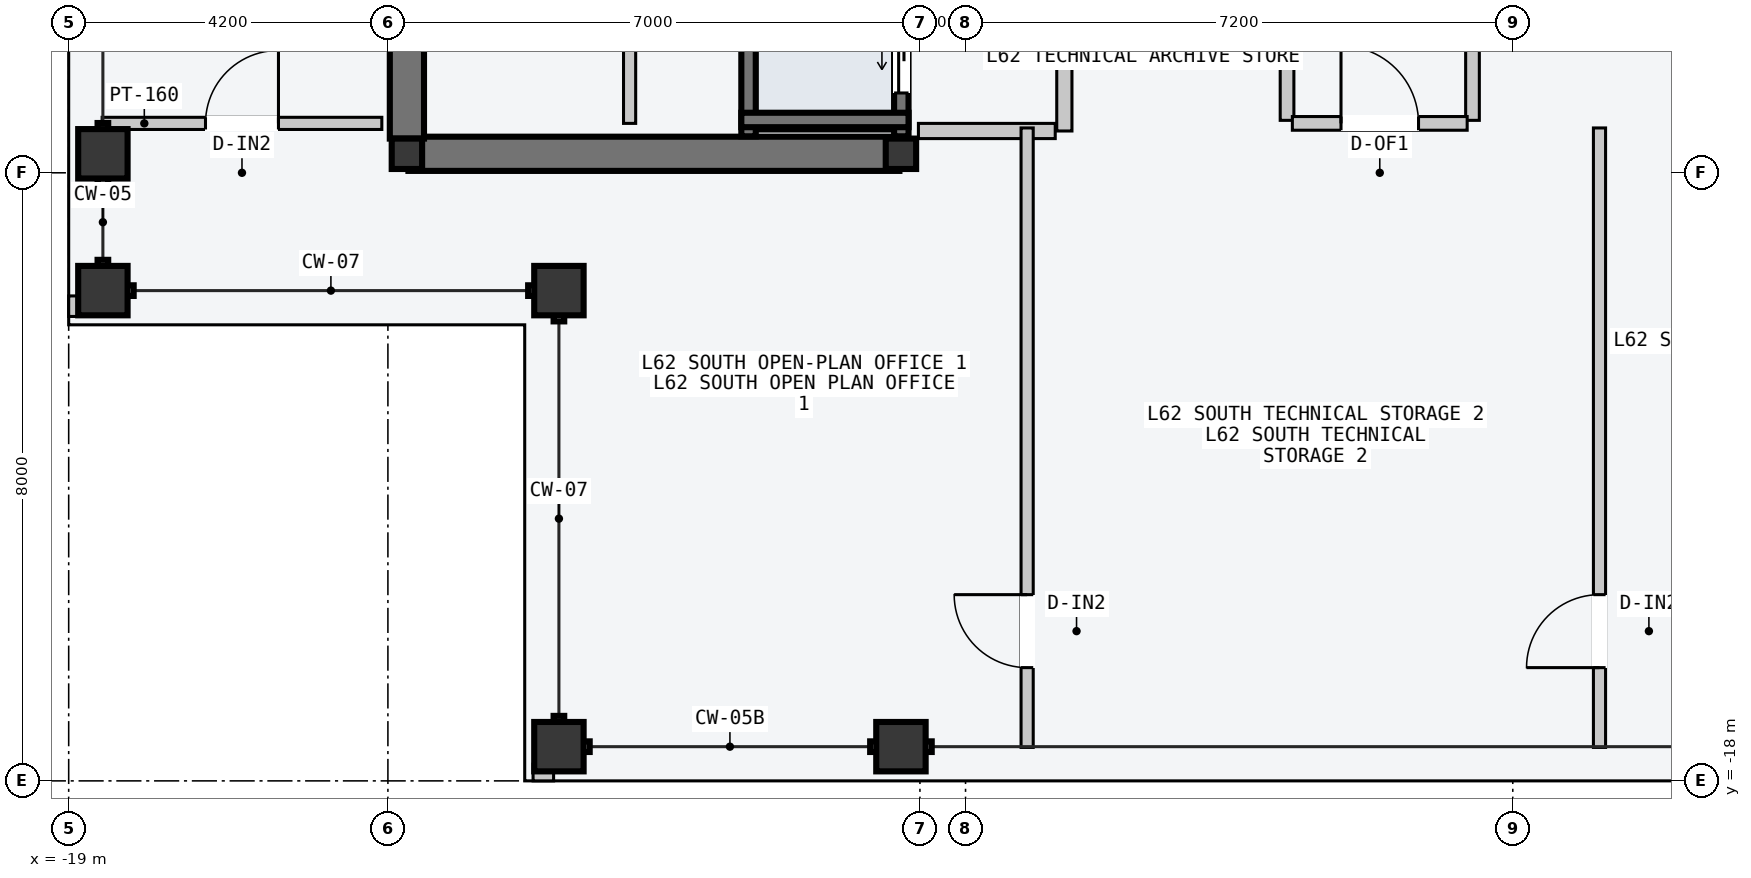
"""IFC4 building model, lengths in metres.
Left out: names, types, materials, properties, quantities, classifications, styles, units other than length and angle.
Written with IfcOpenShell. Run it as: python <this file> out.ifc"""

import sys

from ifc_helpers import new_model, si_unit, direction, frame, frame_2d, origin, origin_2d, place, context, subcontext, project, spatial, rectangle, hollow_rectangle, i_section, extrude, element, fill, save


model = new_model("IFC4")
c1 = context("Model", 3, precision=1e-05, world=origin(), true_north=direction((0.0, 1.0)))
c2 = subcontext(c1, "Body", "Model", "MODEL_VIEW")
j1 = project(units=[si_unit("LENGTHUNIT", "METRE"), si_unit("PLANEANGLEUNIT", "RADIAN")], contexts=[c1])
p1 = place(None, origin())
s1 = spatial("IfcSite", under=j1, at=p1, CompositionType="ELEMENT")
p2 = place(p1, origin())
s2 = spatial("IfcBuilding", under=s1, at=p2, CompositionType="ELEMENT")
p3 = place(p2, frame((0.0, 0.0, 236.4)))
s3 = spatial("IfcBuildingStorey", under=s2, at=p3, CompositionType="ELEMENT", Elevation=236.4)
p4 = place(p3, frame((-14.53, -9.75, -0.2), z_axis=(0.0, 0.0, 1.0), x_axis=(1.0, 0.0, 0.0)))
e1 = element("IfcWall", 1, at=p4, inside=s3, PredefinedType="SHEAR", context=c2, shape_type="SweptSolid", body=[
    extrude(rectangle(XDim=6.46, YDim=0.45, at=frame_2d((3.23, 0.0))), origin(), (0.0, 0.0, 1.0), 3.6),
])
p5 = place(p3, frame((-14.55, -9.55, -0.2), z_axis=(0.0, 0.0, 1.0), x_axis=(0.0, 1.0, 0.0)))
e2 = element("IfcWall", 2, at=p5, inside=s3, PredefinedType="SHEAR", context=c2, shape_type="SweptSolid", body=[
    extrude(rectangle(XDim=9.35, YDim=0.45, at=frame_2d((4.675, 0.0))), origin(), (0.0, 0.0, 1.0), 3.6),
])
for number, where, z_axis, x_axis in (
    (3, (-14.55, -9.75, 0.0), (0.0, 0.0, 1.0), (1.0, 0.0, 0.0)),
    (4, (-8.05, -9.75, 0.0), (0.0, 0.0, 1.0), (1.0, 0.0, 0.0)),
):
    element("IfcColumn", number, at=place(p3, frame(where, z_axis=z_axis, x_axis=x_axis)), inside=s3, PredefinedType="COLUMN", context=c2, shape_type="SweptSolid", body=[
        extrude(i_section(OverallWidth=0.4, OverallDepth=0.4, WebThickness=0.013, FlangeThickness=0.021, at=origin_2d()), origin(), (0.0, 0.0, 1.0), 3.6),
    ])
for number, where, z_axis, x_axis in (
    (5, (-12.55, -17.55, 0.0), (0.0, 0.0, 1.0), (1.0, 0.0, 0.0)),
    (6, (-8.05, -17.55, 0.0), (0.0, 0.0, 1.0), (1.0, 0.0, 0.0)),
    (7, (-18.55, -11.55, 0.0), (0.0, 0.0, 1.0), (0.0, 1.0, 0.0)),
    (8, (-18.55, -9.75, 0.0), (0.0, 0.0, 1.0), (0.0, 1.0, 0.0)),
    (9, (-12.55, -11.55, 0.0), (0.0, 0.0, 1.0), (1.0, 0.0, 0.0)),
):
    element("IfcColumn", number, at=place(p3, frame(where, z_axis=z_axis, x_axis=x_axis)), inside=s3, PredefinedType="COLUMN", context=c2, shape_type="SweptSolid", body=[
        extrude(hollow_rectangle(XDim=0.65, YDim=0.65, WallThickness=0.028, at=origin_2d()), origin(), (0.0, 0.0, 1.0), 3.6),
    ])
for number, where, z_axis, x_axis in (
    (10, (-12.89, -17.89, 0.0), (0.0, 0.0, 1.0), (1.0, 0.0, 0.0)),
    (11, (-18.89, -11.89, 0.0), (0.0, 0.0, 1.0), (0.0, 1.0, 0.0)),
):
    element("IfcWall", number, at=place(p3, frame(where, z_axis=z_axis, x_axis=x_axis)), inside=s3, PredefinedType="PARAPET", context=c2, shape_type="SweptSolid", body=[
        extrude(rectangle(XDim=0.27, YDim=0.22, at=frame_2d((0.135, 0.0))), origin(), (0.0, 0.0, 1.0), 1.2),
    ])
p6 = place(p3, frame((-8.045, -9.52, -0.2), z_axis=(0.0, 0.0, 1.0), x_axis=(0.0, 1.0, 0.0)))
e12 = element("IfcWall", 12, at=p6, inside=s3, PredefinedType="SOLIDWALL", context=c2, shape_type="SweptSolid", body=[
    extrude(rectangle(XDim=2.12, YDim=0.19, at=frame_2d((1.06, 0.0))), origin(), (0.0, 0.0, 1.0), 3.6),
])
p7 = place(p6, frame((0.57, 0.0, 0.2)))
e13 = element("IfcOpeningElement", 13, at=p7, cuts=e12, PredefinedType="OPENING", context=c2, shape_type="SweptSolid", body=[
    extrude(rectangle(XDim=1.1, YDim=2.2, at=frame_2d((0.55, 1.1))), frame((0.0, 0.105, 0.0), z_axis=(0.0, -1.0, 0.0), x_axis=(1.0, 0.0, 0.0)), (0.0, 0.0, 1.0), 0.21),
])
p8 = place(p3, frame((-10.055, -9.52, -0.2), z_axis=(0.0, 0.0, 1.0), x_axis=(0.0, 1.0, 0.0)))
e14 = element("IfcWall", 14, at=p8, inside=s3, PredefinedType="SOLIDWALL", context=c2, shape_type="SweptSolid", body=[
    extrude(rectangle(XDim=2.12, YDim=0.19, at=frame_2d((1.06, 0.0))), origin(), (0.0, 0.0, 1.0), 3.6),
])
p9 = place(p3, frame((-10.15, -9.305, -0.2), z_axis=(0.0, 0.0, 1.0), x_axis=(1.0, 0.0, 0.0)))
e15 = element("IfcWall", 15, at=p9, inside=s3, PredefinedType="SOLIDWALL", context=c2, shape_type="SweptSolid", body=[
    extrude(rectangle(XDim=2.2, YDim=0.19, at=frame_2d((1.1, 0.0))), origin(), (0.0, 0.0, 1.0), 3.6),
])
p10 = place(p3, frame((-5.9, -9.45, 0.0), z_axis=(0.0, 0.0, 1.0), x_axis=(0.0, 1.0, 0.0)))
e16 = element("IfcWall", 16, at=p10, inside=s3, PredefinedType="PARTITIONING", context=c2, shape_type="SweptSolid", body=[
    extrude(rectangle(XDim=10.5, YDim=0.2, at=frame_2d((5.25, 0.0))), origin(), (0.0, 0.0, 1.0), 3.4),
])
p11 = place(p10, frame((3.9, 0.0, 0.0)))
e17 = element("IfcOpeningElement", 17, at=p11, cuts=e16, PredefinedType="OPENING", context=c2, shape_type="SweptSolid", body=[
    extrude(rectangle(XDim=1.5, YDim=2.2, at=frame_2d((0.75, 1.1))), frame((0.0, 0.11, 0.0), z_axis=(0.0, -1.0, 0.0), x_axis=(1.0, 0.0, 0.0)), (0.0, 0.0, 1.0), 0.22),
])
p12 = place(p3, frame((-6.02, -9.45, 0.0), z_axis=(0.0, 0.0, 1.0), x_axis=(-1.0, 0.0, 0.0)))
e18 = element("IfcWall", 18, at=p12, inside=s3, PredefinedType="PARTITIONING", context=c2, shape_type="SweptSolid", body=[
    extrude(rectangle(XDim=1.8, YDim=0.2, at=frame_2d((0.9, 0.0))), origin(), (0.0, 0.0, 1.0), 3.4),
])
p13 = place(p3, frame((-11.62, -9.35, 0.0), z_axis=(0.0, 0.0, 1.0), x_axis=(0.0, 1.0, 0.0)))
e19 = element("IfcWall", 19, at=p13, inside=s3, PredefinedType="PARTITIONING", context=c2, shape_type="SweptSolid", body=[
    extrude(rectangle(XDim=3.85, YDim=0.16, at=frame_2d((1.925, 0.0))), origin(), (0.0, 0.0, 1.0), 3.4),
])
p14 = place(p13, frame((1.475, 0.0, 0.0)))
e20 = element("IfcOpeningElement", 20, at=p14, cuts=e19, PredefinedType="OPENING", context=c2, shape_type="SweptSolid", body=[
    extrude(rectangle(XDim=0.9, YDim=2.15, at=frame_2d((0.45, 1.075))), frame((0.0, 0.09, 0.0), z_axis=(0.0, -1.0, 0.0), x_axis=(1.0, 0.0, 0.0)), (0.0, 0.0, 1.0), 0.18),
])
p15 = place(p3, frame((-2.97, -9.31, 0.0), z_axis=(0.0, 0.0, 1.0), x_axis=(0.0, 1.0, 0.0)))
e21 = element("IfcWall", 21, at=p15, inside=s3, PredefinedType="PARTITIONING", context=c2, shape_type="SweptSolid", body=[
    extrude(rectangle(XDim=3.63, YDim=0.18, at=frame_2d((1.815, 0.0))), origin(), (0.0, 0.0, 1.0), 3.4),
])
p16 = place(p15, frame((1.15, 0.0, 0.0)))
e22 = element("IfcOpeningElement", 22, at=p16, cuts=e21, PredefinedType="OPENING", context=c2, shape_type="SweptSolid", body=[
    extrude(rectangle(XDim=0.96, YDim=2.18, at=frame_2d((0.48, 1.09))), frame((0.0, 0.1, 0.0), z_axis=(0.0, -1.0, 0.0), x_axis=(1.0, 0.0, 0.0)), (0.0, 0.0, 1.0), 0.2),
])
p17 = place(p3, frame((-0.53, -9.31, 0.0), z_axis=(0.0, 0.0, 1.0), x_axis=(0.0, 1.0, 0.0)))
e23 = element("IfcWall", 23, at=p17, inside=s3, PredefinedType="PARTITIONING", context=c2, shape_type="SweptSolid", body=[
    extrude(rectangle(XDim=3.63, YDim=0.18, at=frame_2d((1.815, 0.0))), origin(), (0.0, 0.0, 1.0), 3.4),
])
p18 = place(p17, frame((1.15, 0.0, 0.0)))
e24 = element("IfcOpeningElement", 24, at=p18, cuts=e23, PredefinedType="OPENING", context=c2, shape_type="SweptSolid", body=[
    extrude(rectangle(XDim=0.96, YDim=2.18, at=frame_2d((0.48, 1.09))), frame((0.0, 0.1, 0.0), z_axis=(0.0, -1.0, 0.0), x_axis=(1.0, 0.0, 0.0)), (0.0, 0.0, 1.0), 0.2),
])
p19 = place(p3, frame((-6.39, -17.56, 0.0), z_axis=(0.0, 0.0, 1.0), x_axis=(0.0, 1.0, 0.0)))
e25 = element("IfcWall", 25, at=p19, inside=s3, PredefinedType="PARTITIONING", context=c2, shape_type="SweptSolid", body=[
    extrude(rectangle(XDim=8.15, YDim=0.16, at=frame_2d((4.075, 0.0))), origin(), (0.0, 0.0, 1.0), 3.4),
])
p20 = place(p19, frame((1.05, 0.0, 0.0)))
e26 = element("IfcOpeningElement", 26, at=p20, cuts=e25, PredefinedType="OPENING", context=c2, shape_type="SweptSolid", body=[
    extrude(rectangle(XDim=0.96, YDim=2.18, at=frame_2d((0.48, 1.09))), frame((0.0, 0.09, 0.0), z_axis=(0.0, -1.0, 0.0), x_axis=(1.0, 0.0, 0.0)), (0.0, 0.0, 1.0), 0.18),
])
p21 = place(p3, frame((1.141, -17.56, 0.0), z_axis=(0.0, 0.0, 1.0), x_axis=(0.0, 1.0, 0.0)))
e27 = element("IfcWall", 27, at=p21, inside=s3, PredefinedType="PARTITIONING", context=c2, shape_type="SweptSolid", body=[
    extrude(rectangle(XDim=8.15, YDim=0.16, at=frame_2d((4.075, 0.0))), origin(), (0.0, 0.0, 1.0), 3.4),
])
p22 = place(p21, frame((1.05, 0.0, 0.0)))
e28 = element("IfcOpeningElement", 28, at=p22, cuts=e27, PredefinedType="OPENING", context=c2, shape_type="SweptSolid", body=[
    extrude(rectangle(XDim=0.96, YDim=2.18, at=frame_2d((0.48, 1.09))), frame((0.0, 0.09, 0.0), z_axis=(0.0, -1.0, 0.0), x_axis=(1.0, 0.0, 0.0)), (0.0, 0.0, 1.0), 0.18),
])
p23 = place(p3, frame((-2.9, -9.35, 0.0), z_axis=(0.0, 0.0, 1.0), x_axis=(1.0, 0.0, 0.0)))
e29 = element("IfcWall", 29, at=p23, inside=s3, PredefinedType="PARTITIONING", context=c2, shape_type="SweptSolid", body=[
    extrude(rectangle(XDim=2.3, YDim=0.18, at=frame_2d((1.15, 0.0))), origin(), (0.0, 0.0, 1.0), 3.4),
])
p24 = place(p23, frame((0.64, 0.0, 0.0)))
e30 = element("IfcOpeningElement", 30, at=p24, cuts=e29, PredefinedType="OPENING", context=c2, shape_type="SweptSolid", body=[
    extrude(rectangle(XDim=1.02, YDim=2.2, at=frame_2d((0.51, 1.1))), frame((0.0, 0.1, 0.0), z_axis=(0.0, -1.0, 0.0), x_axis=(1.0, 0.0, 0.0)), (0.0, 0.0, 1.0), 0.2),
])
p25 = place(p3, frame((-18.56, -9.35, 0.0), z_axis=(0.0, 0.0, 1.0), x_axis=(1.0, 0.0, 0.0)))
e31 = element("IfcWall", 31, at=p25, inside=s3, PredefinedType="PARTITIONING", context=c2, shape_type="SweptSolid", body=[
    extrude(rectangle(XDim=3.68, YDim=0.16, at=frame_2d((1.84, 0.0))), origin(), (0.0, 0.0, 1.0), 3.4),
])
p26 = place(p25, frame((1.36, 0.0, 0.0)))
e32 = element("IfcOpeningElement", 32, at=p26, cuts=e31, PredefinedType="OPENING", context=c2, shape_type="SweptSolid", body=[
    extrude(rectangle(XDim=0.96, YDim=2.18, at=frame_2d((0.48, 1.09))), frame((0.0, 0.09, 0.0), z_axis=(0.0, -1.0, 0.0), x_axis=(1.0, 0.0, 0.0)), (0.0, 0.0, 1.0), 0.18),
])
p27 = place(p7, origin())
e33 = element("IfcDoor", 33, at=p27, inside=s3, OperationType="SLIDING_TO_LEFT", PredefinedType="DOOR", context=c2, shape_type="SweptSolid", body=[
    extrude(rectangle(XDim=1.1, YDim=2.2, at=frame_2d((0.55, 1.1))), frame((0.0, 0.025, 0.0), z_axis=(0.0, -1.0, 0.0), x_axis=(1.0, 0.0, 0.0)), (0.0, 0.0, 1.0), 0.05),
])
fill(e13, e33)
p28 = place(p20, origin())
e34 = element("IfcDoor", 34, at=p28, inside=s3, OperationType="SINGLE_SWING_RIGHT", PredefinedType="DOOR", context=c2, shape_type="SweptSolid", body=[
    extrude(rectangle(XDim=0.96, YDim=2.18, at=frame_2d((0.48, 1.09))), frame((0.0, 0.025, 0.0), z_axis=(0.0, -1.0, 0.0), x_axis=(1.0, 0.0, 0.0)), (0.0, 0.0, 1.0), 0.05),
])
fill(e26, e34)
p29 = place(p22, origin())
e35 = element("IfcDoor", 35, at=p29, inside=s3, OperationType="SINGLE_SWING_LEFT", PredefinedType="DOOR", context=c2, shape_type="SweptSolid", body=[
    extrude(rectangle(XDim=0.96, YDim=2.18, at=frame_2d((0.48, 1.09))), frame((0.0, 0.025, 0.0), z_axis=(0.0, -1.0, 0.0), x_axis=(1.0, 0.0, 0.0)), (0.0, 0.0, 1.0), 0.05),
])
fill(e28, e35)
p30 = place(p24, origin())
e36 = element("IfcDoor", 36, at=p30, inside=s3, OperationType="SINGLE_SWING_LEFT", PredefinedType="DOOR", context=c2, shape_type="SweptSolid", body=[
    extrude(rectangle(XDim=1.02, YDim=2.2, at=frame_2d((0.51, 1.1))), frame((0.0, 0.025, 0.0), z_axis=(0.0, -1.0, 0.0), x_axis=(1.0, 0.0, 0.0)), (0.0, 0.0, 1.0), 0.05),
])
fill(e30, e36)
p31 = place(p26, origin())
e37 = element("IfcDoor", 37, at=p31, inside=s3, OperationType="SINGLE_SWING_RIGHT", PredefinedType="DOOR", context=c2, shape_type="SweptSolid", body=[
    extrude(rectangle(XDim=0.96, YDim=2.18, at=frame_2d((0.48, 1.09))), frame((0.0, 0.025, 0.0), z_axis=(0.0, -1.0, 0.0), x_axis=(1.0, 0.0, 0.0)), (0.0, 0.0, 1.0), 0.05),
])
fill(e32, e37)
save(model, sys.argv[1])
